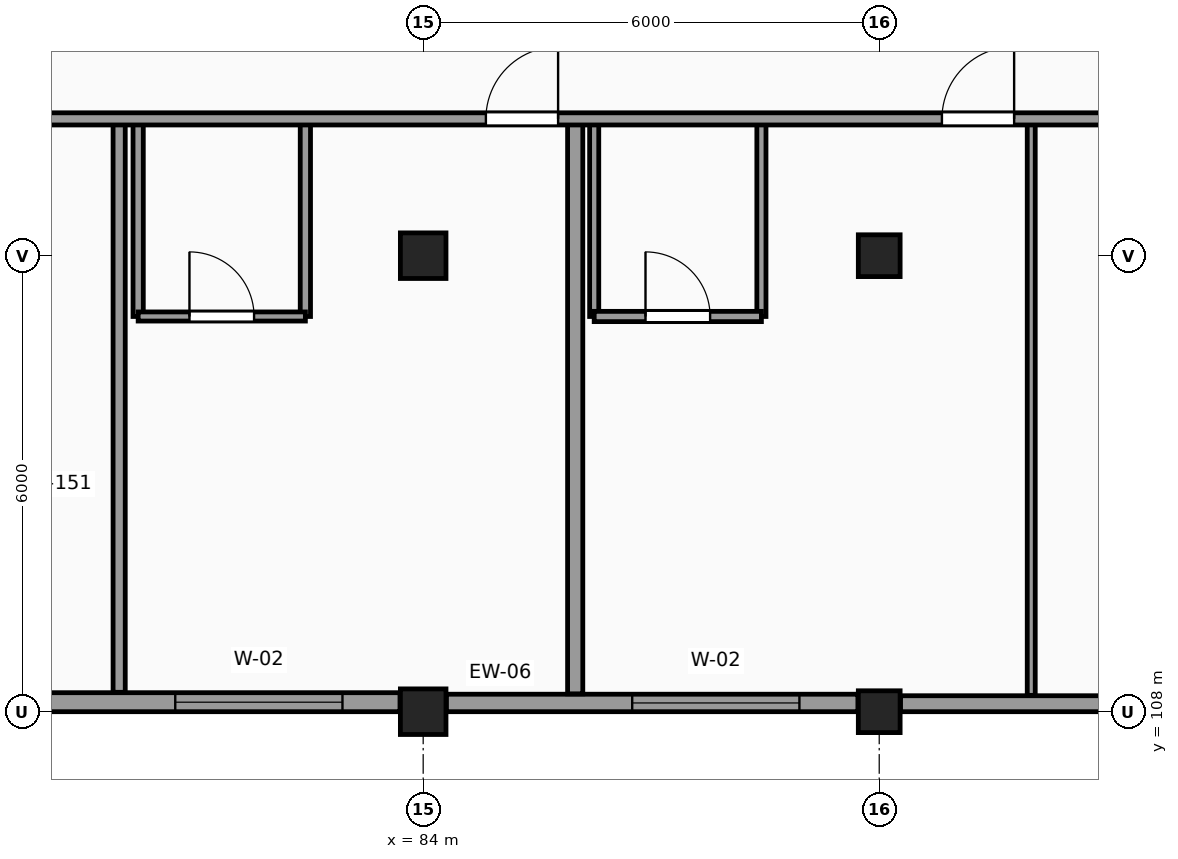
"""IFC4 building model, lengths in metres.
Left out: names, types, materials, properties, quantities, classifications, styles, units other than length and angle.
Written with IfcOpenShell. Run it as: python <this file> out.ifc"""

import sys

from ifc_helpers import new_model, si_unit, direction, frame, frame_2d, origin, origin_2d, place, context, subcontext, project, spatial, rectangle, extrude, element, fill, save


model = new_model("IFC4")
c1 = context("Model", 3, precision=1e-05, world=origin(), true_north=direction((0.0, 1.0)))
c2 = subcontext(c1, "Body", "Model", "MODEL_VIEW")
j1 = project(units=[si_unit("LENGTHUNIT", "METRE"), si_unit("PLANEANGLEUNIT", "RADIAN")], contexts=[c1])
p1 = place(None, origin())
s1 = spatial("IfcSite", under=j1, at=p1, CompositionType="ELEMENT")
p2 = place(p1, origin())
s2 = spatial("IfcBuilding", under=s1, at=p2, CompositionType="ELEMENT")
p3 = place(p2, frame((0.0, 0.0, 24.6)))
s3 = spatial("IfcBuildingStorey", under=s2, at=p3, CompositionType="ELEMENT", Elevation=24.6)
for number, where, z_axis, x_axis in (
    (1, (84.0, 108.0, 0.0), (0.0, 0.0, 1.0), (1.0, 0.0, 0.0)),
    (2, (84.0, 114.0, 0.0), (0.0, 0.0, 1.0), (1.0, 0.0, 0.0)),
):
    element("IfcColumn", number, at=place(p3, frame(where, z_axis=z_axis, x_axis=x_axis)), inside=s3, PredefinedType="COLUMN", context=c2, shape_type="SweptSolid", body=[
        extrude(rectangle(XDim=0.6, YDim=0.6, at=origin_2d()), origin(), (0.0, 0.0, 1.0), 3.6),
    ])
for number, where, z_axis, x_axis in (
    (3, (90.0, 108.0, 0.0), (0.0, 0.0, 1.0), (1.0, 0.0, 0.0)),
    (4, (90.0, 114.0, 0.0), (0.0, 0.0, 1.0), (1.0, 0.0, 0.0)),
):
    element("IfcColumn", number, at=place(p3, frame(where, z_axis=z_axis, x_axis=x_axis)), inside=s3, PredefinedType="COLUMN", context=c2, shape_type="SweptSolid", body=[
        extrude(rectangle(XDim=0.55, YDim=0.55, at=origin_2d()), origin(), (0.0, 0.0, 1.0), 3.6),
    ])
p4 = place(p3, frame((78.28, 108.125, 0.0), z_axis=(0.0, 0.0, 1.0), x_axis=(1.0, 0.0, 0.0)))
e5 = element("IfcWall", 5, at=p4, inside=s3, PredefinedType="SOLIDWALL", context=c2, shape_type="SweptSolid", body=[
    extrude(rectangle(XDim=5.415, YDim=0.25, at=frame_2d((2.708, 0.0))), origin(), (0.0, 0.0, 1.0), 2.73),
])
p5 = place(p4, frame((2.458, 0.0, 0.8)))
e6 = element("IfcOpeningElement", 6, at=p5, cuts=e5, PredefinedType="OPENING", context=c2, shape_type="SweptSolid", body=[
    extrude(rectangle(XDim=2.2, YDim=1.75, at=frame_2d((1.1, 0.875))), frame((0.0, 0.135, 0.0), z_axis=(0.0, -1.0, 0.0), x_axis=(1.0, 0.0, 0.0)), (0.0, 0.0, 1.0), 0.27),
])
p6 = place(p3, frame((84.305, 108.115, 0.0), z_axis=(0.0, 0.0, 1.0), x_axis=(1.0, 0.0, 0.0)))
e7 = element("IfcWall", 7, at=p6, inside=s3, PredefinedType="SOLIDWALL", context=c2, shape_type="SweptSolid", body=[
    extrude(rectangle(XDim=5.415, YDim=0.23, at=frame_2d((2.708, 0.0))), origin(), (0.0, 0.0, 1.0), 2.73),
])
p7 = place(p6, frame((2.445, 0.0, 0.8)))
e8 = element("IfcOpeningElement", 8, at=p7, cuts=e7, PredefinedType="OPENING", context=c2, shape_type="SweptSolid", body=[
    extrude(rectangle(XDim=2.2, YDim=1.75, at=frame_2d((1.1, 0.875))), frame((0.0, 0.125, 0.0), z_axis=(0.0, -1.0, 0.0), x_axis=(1.0, 0.0, 0.0)), (0.0, 0.0, 1.0), 0.25),
])
p8 = place(p3, frame((90.28, 108.105, 0.0), z_axis=(0.0, 0.0, 1.0), x_axis=(1.0, 0.0, 0.0)))
e9 = element("IfcWall", 9, at=p8, inside=s3, PredefinedType="SOLIDWALL", context=c2, shape_type="SweptSolid", body=[
    extrude(rectangle(XDim=5.415, YDim=0.21, at=frame_2d((2.708, 0.0))), origin(), (0.0, 0.0, 1.0), 2.73),
])
p9 = place(p3, frame((80.0, 108.255, 0.0), z_axis=(0.0, 0.0, 1.0), x_axis=(0.0, 1.0, 0.0)))
e10 = element("IfcWall", 10, at=p9, inside=s3, PredefinedType="PARTITIONING", context=c2, shape_type="SweptSolid", body=[
    extrude(rectangle(XDim=7.545, YDim=0.16, at=frame_2d((3.772, 0.0))), origin(), (0.0, 0.0, 1.0), 3.38),
])
for number, where, z_axis, x_axis in (
    (11, (80.25, 113.2, 0.0), (0.0, 0.0, 1.0), (0.0, 1.0, 0.0)),
    (12, (82.45, 113.2, 0.0), (0.0, 0.0, 1.0), (0.0, 1.0, 0.0)),
):
    element("IfcWall", number, at=place(p3, frame(where, z_axis=z_axis, x_axis=x_axis)), inside=s3, PredefinedType="PARTITIONING", context=c2, shape_type="SweptSolid", body=[
        extrude(rectangle(XDim=2.6, YDim=0.135, at=frame_2d((1.3, 0.0))), origin(), (0.0, 0.0, 1.0), 3.38),
    ])
p10 = place(p3, frame((86.0, 108.235, 0.0), z_axis=(0.0, 0.0, 1.0), x_axis=(0.0, 1.0, 0.0)))
e13 = element("IfcWall", 13, at=p10, inside=s3, PredefinedType="PARTITIONING", context=c2, shape_type="SweptSolid", body=[
    extrude(rectangle(XDim=7.565, YDim=0.2, at=frame_2d((3.782, 0.0))), origin(), (0.0, 0.0, 1.0), 3.38),
])
for number, where, z_axis, x_axis in (
    (14, (86.25, 113.2, 0.0), (0.0, 0.0, 1.0), (0.0, 1.0, 0.0)),
    (15, (88.45, 113.2, 0.0), (0.0, 0.0, 1.0), (0.0, 1.0, 0.0)),
):
    element("IfcWall", number, at=place(p3, frame(where, z_axis=z_axis, x_axis=x_axis)), inside=s3, PredefinedType="PARTITIONING", context=c2, shape_type="SweptSolid", body=[
        extrude(rectangle(XDim=2.6, YDim=0.12, at=frame_2d((1.3, 0.0))), origin(), (0.0, 0.0, 1.0), 3.38),
    ])
p11 = place(p3, frame((92.0, 108.215, 0.0), z_axis=(0.0, 0.0, 1.0), x_axis=(0.0, 1.0, 0.0)))
e16 = element("IfcWall", 16, at=p11, inside=s3, PredefinedType="PARTITIONING", context=c2, shape_type="SweptSolid", body=[
    extrude(rectangle(XDim=7.585, YDim=0.105, at=frame_2d((3.792, 0.0))), origin(), (0.0, 0.0, 1.0), 3.38),
])
p12 = place(p3, frame((80.25, 113.2, 0.0), z_axis=(0.0, 0.0, 1.0), x_axis=(1.0, 0.0, 0.0)))
e17 = element("IfcWall", 17, at=p12, inside=s3, PredefinedType="PARTITIONING", context=c2, shape_type="SweptSolid", body=[
    extrude(rectangle(XDim=2.2, YDim=0.12, at=frame_2d((1.1, 0.0))), origin(), (0.0, 0.0, 1.0), 3.38),
])
p13 = place(p12, frame((0.675, 0.0, 0.0)))
e18 = element("IfcOpeningElement", 18, at=p13, cuts=e17, PredefinedType="OPENING", context=c2, shape_type="SweptSolid", body=[
    extrude(rectangle(XDim=0.85, YDim=2.1, at=frame_2d((0.425, 1.05))), frame((0.0, 0.07, 0.0), z_axis=(0.0, -1.0, 0.0), x_axis=(1.0, 0.0, 0.0)), (0.0, 0.0, 1.0), 0.14),
])
p14 = place(p3, frame((86.25, 113.2, 0.0), z_axis=(0.0, 0.0, 1.0), x_axis=(1.0, 0.0, 0.0)))
e19 = element("IfcWall", 19, at=p14, inside=s3, PredefinedType="PARTITIONING", context=c2, shape_type="SweptSolid", body=[
    extrude(rectangle(XDim=2.2, YDim=0.135, at=frame_2d((1.1, 0.0))), origin(), (0.0, 0.0, 1.0), 3.38),
])
p15 = place(p14, frame((0.675, 0.0, 0.0)))
e20 = element("IfcOpeningElement", 20, at=p15, cuts=e19, PredefinedType="OPENING", context=c2, shape_type="SweptSolid", body=[
    extrude(rectangle(XDim=0.85, YDim=2.1, at=frame_2d((0.425, 1.05))), frame((0.0, 0.078, 0.0), z_axis=(0.0, -1.0, 0.0), x_axis=(1.0, 0.0, 0.0)), (0.0, 0.0, 1.0), 0.155),
])
p16 = place(p3, frame((66.255, 115.8, 0.0), z_axis=(0.0, 0.0, 1.0), x_axis=(1.0, 0.0, 0.0)))
e21 = element("IfcWall", 21, at=p16, inside=s3, PredefinedType="PARTITIONING", context=c2, shape_type="SweptSolid", body=[
    extrude(rectangle(XDim=103.545, YDim=0.16, at=frame_2d((51.772, 0.0))), origin(), (0.0, 0.0, 1.0), 3.38),
])
p17 = place(p16, frame((80.145, 0.0, 0.0)))
e22 = element("IfcOpeningElement", 22, at=p17, cuts=e21, PredefinedType="OPENING", context=c2, shape_type="SweptSolid", body=[
    extrude(rectangle(XDim=1.2, YDim=2.2, at=frame_2d((0.6, 1.1))), frame((0.0, 0.09, 0.0), z_axis=(0.0, -1.0, 0.0), x_axis=(1.0, 0.0, 0.0)), (0.0, 0.0, 1.0), 0.18),
])
p18 = place(p16, frame((50.145, 0.0, 0.0)))
e23 = element("IfcOpeningElement", 23, at=p18, cuts=e21, PredefinedType="OPENING", context=c2, shape_type="SweptSolid", body=[
    extrude(rectangle(XDim=1.2, YDim=2.2, at=frame_2d((0.6, 1.1))), frame((0.0, 0.09, 0.0), z_axis=(0.0, -1.0, 0.0), x_axis=(1.0, 0.0, 0.0)), (0.0, 0.0, 1.0), 0.18),
])
p19 = place(p16, frame((8.995, 0.0, 0.0)))
e24 = element("IfcOpeningElement", 24, at=p19, cuts=e21, PredefinedType="OPENING", context=c2, shape_type="SweptSolid", body=[
    extrude(rectangle(XDim=1.1, YDim=2.15, at=frame_2d((0.55, 1.075))), frame((0.0, 0.09, 0.0), z_axis=(0.0, -1.0, 0.0), x_axis=(1.0, 0.0, 0.0)), (0.0, 0.0, 1.0), 0.18),
])
p20 = place(p16, frame((55.295, 0.0, 0.0)))
e25 = element("IfcOpeningElement", 25, at=p20, cuts=e21, PredefinedType="OPENING", context=c2, shape_type="SweptSolid", body=[
    extrude(rectangle(XDim=1.0, YDim=2.15, at=frame_2d((0.5, 1.075))), frame((0.0, 0.09, 0.0), z_axis=(0.0, -1.0, 0.0), x_axis=(1.0, 0.0, 0.0)), (0.0, 0.0, 1.0), 0.18),
])
p21 = place(p16, frame((62.265, 0.0, 0.0)))
e26 = element("IfcOpeningElement", 26, at=p21, cuts=e21, PredefinedType="OPENING", context=c2, shape_type="SweptSolid", body=[
    extrude(rectangle(XDim=0.96, YDim=2.15, at=frame_2d((0.48, 1.075))), frame((0.0, 0.09, 0.0), z_axis=(0.0, -1.0, 0.0), x_axis=(1.0, 0.0, 0.0)), (0.0, 0.0, 1.0), 0.18),
])
p22 = place(p16, frame((31.945, 0.0, 0.0)))
e27 = element("IfcOpeningElement", 27, at=p22, cuts=e21, PredefinedType="OPENING", context=c2, shape_type="SweptSolid", body=[
    extrude(rectangle(XDim=1.6, YDim=2.25, at=frame_2d((0.8, 1.125))), frame((0.0, 0.09, 0.0), z_axis=(0.0, -1.0, 0.0), x_axis=(1.0, 0.0, 0.0)), (0.0, 0.0, 1.0), 0.18),
])
p23 = place(p16, frame((18.57, 0.0, 0.0)))
e28 = element("IfcOpeningElement", 28, at=p23, cuts=e21, PredefinedType="OPENING", context=c2, shape_type="SweptSolid", body=[
    extrude(rectangle(XDim=0.95, YDim=2.1, at=frame_2d((0.475, 1.05))), frame((0.0, 0.09, 0.0), z_axis=(0.0, -1.0, 0.0), x_axis=(1.0, 0.0, 0.0)), (0.0, 0.0, 1.0), 0.18),
])
p24 = place(p16, frame((24.57, 0.0, 0.0)))
e29 = element("IfcOpeningElement", 29, at=p24, cuts=e21, PredefinedType="OPENING", context=c2, shape_type="SweptSolid", body=[
    extrude(rectangle(XDim=0.95, YDim=2.1, at=frame_2d((0.475, 1.05))), frame((0.0, 0.09, 0.0), z_axis=(0.0, -1.0, 0.0), x_axis=(1.0, 0.0, 0.0)), (0.0, 0.0, 1.0), 0.18),
])
p25 = place(p16, frame((84.47, 0.0, 0.0)))
e30 = element("IfcOpeningElement", 30, at=p25, cuts=e21, PredefinedType="OPENING", context=c2, shape_type="SweptSolid", body=[
    extrude(rectangle(XDim=0.95, YDim=2.1, at=frame_2d((0.475, 1.05))), frame((0.0, 0.09, 0.0), z_axis=(0.0, -1.0, 0.0), x_axis=(1.0, 0.0, 0.0)), (0.0, 0.0, 1.0), 0.18),
])
p26 = place(p5, origin())
e31 = element("IfcWindow", 31, at=p26, inside=s3, PartitioningType="SINGLE_PANEL", PredefinedType="WINDOW", context=c2, shape_type="SweptSolid", body=[
    extrude(rectangle(XDim=2.2, YDim=1.75, at=frame_2d((1.1, 0.875))), frame((0.0, 0.03, 0.0), z_axis=(0.0, -1.0, 0.0), x_axis=(1.0, 0.0, 0.0)), (0.0, 0.0, 1.0), 0.06),
])
fill(e6, e31)
p27 = place(p7, origin())
e32 = element("IfcWindow", 32, at=p27, inside=s3, PartitioningType="SINGLE_PANEL", PredefinedType="WINDOW", context=c2, shape_type="SweptSolid", body=[
    extrude(rectangle(XDim=2.2, YDim=1.75, at=frame_2d((1.1, 0.875))), frame((0.0, 0.03, 0.0), z_axis=(0.0, -1.0, 0.0), x_axis=(1.0, 0.0, 0.0)), (0.0, 0.0, 1.0), 0.06),
])
fill(e8, e32)
p28 = place(p13, origin())
e33 = element("IfcDoor", 33, at=p28, inside=s3, OperationType="SINGLE_SWING_LEFT", PredefinedType="DOOR", context=c2, shape_type="SweptSolid", body=[
    extrude(rectangle(XDim=0.85, YDim=2.1, at=frame_2d((0.425, 1.05))), frame((0.0, 0.025, 0.0), z_axis=(0.0, -1.0, 0.0), x_axis=(1.0, 0.0, 0.0)), (0.0, 0.0, 1.0), 0.05),
])
fill(e18, e33)
p29 = place(p23, origin())
e34 = element("IfcDoor", 34, at=p29, inside=s3, OperationType="SINGLE_SWING_RIGHT", PredefinedType="DOOR", context=c2, shape_type="SweptSolid", body=[
    extrude(rectangle(XDim=0.95, YDim=2.1, at=frame_2d((0.475, 1.05))), frame((0.0, 0.025, 0.0), z_axis=(0.0, -1.0, 0.0), x_axis=(1.0, 0.0, 0.0)), (0.0, 0.0, 1.0), 0.05),
])
fill(e28, e34)
p30 = place(p15, origin())
e35 = element("IfcDoor", 35, at=p30, inside=s3, OperationType="SINGLE_SWING_LEFT", PredefinedType="DOOR", context=c2, shape_type="SweptSolid", body=[
    extrude(rectangle(XDim=0.85, YDim=2.1, at=frame_2d((0.425, 1.05))), frame((0.0, 0.025, 0.0), z_axis=(0.0, -1.0, 0.0), x_axis=(1.0, 0.0, 0.0)), (0.0, 0.0, 1.0), 0.05),
])
fill(e20, e35)
p31 = place(p24, origin())
e36 = element("IfcDoor", 36, at=p31, inside=s3, OperationType="SINGLE_SWING_RIGHT", PredefinedType="DOOR", context=c2, shape_type="SweptSolid", body=[
    extrude(rectangle(XDim=0.95, YDim=2.1, at=frame_2d((0.475, 1.05))), frame((0.0, 0.025, 0.0), z_axis=(0.0, -1.0, 0.0), x_axis=(1.0, 0.0, 0.0)), (0.0, 0.0, 1.0), 0.05),
])
fill(e29, e36)
save(model, sys.argv[1])
